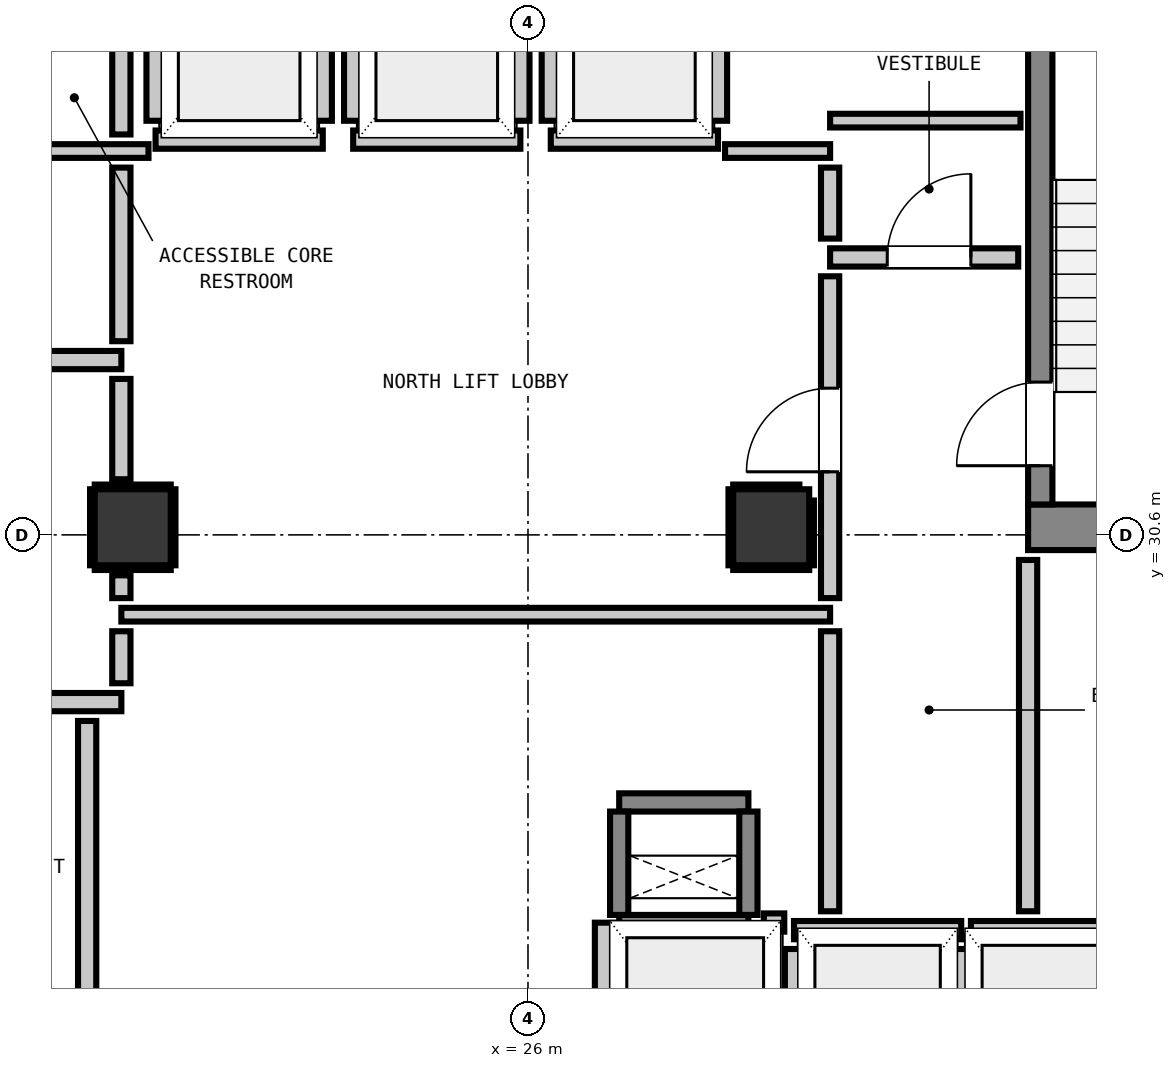
"""IFC4 building model, lengths in metres.
Left out: names, types, materials, properties, quantities, classifications, styles, units other than length and angle.
Written with IfcOpenShell. Run it as: python <this file> out.ifc"""

import sys

from ifc_helpers import new_model, si_unit, direction, frame, frame_2d, origin, origin_2d, place, context, subcontext, project, spatial, rectangle, extrude, element, fill, save


model = new_model("IFC4")
c1 = context("Model", 3, precision=1e-05, world=origin(), true_north=direction((0.0, 1.0)))
c2 = subcontext(c1, "Body", "Model", "MODEL_VIEW")
j1 = project(units=[si_unit("LENGTHUNIT", "METRE"), si_unit("PLANEANGLEUNIT", "RADIAN")], contexts=[c1])
p1 = place(None, origin())
s1 = spatial("IfcSite", under=j1, at=p1, CompositionType="ELEMENT")
p2 = place(p1, origin())
s2 = spatial("IfcBuilding", under=s1, at=p2, CompositionType="ELEMENT")
p3 = place(p2, frame((0.0, 0.0, 38.6)))
s3 = spatial("IfcBuildingStorey", under=s2, at=p3, CompositionType="ELEMENT", Elevation=38.6)
p4 = place(p3, frame((32.58, 30.7, 0.0), z_axis=(0.0, 0.0, 1.0), x_axis=(1.0, 0.0, 0.0)))
e1 = element("IfcWall", 1, at=p4, inside=s3, PredefinedType="SHEAR", context=c2, shape_type="SweptSolid", body=[
    extrude(rectangle(XDim=3.415, YDim=0.6, at=frame_2d((1.708, 0.0))), origin(), (0.0, 0.0, 1.0), 3.32),
])
p5 = place(p3, frame((32.74, 31.0, 0.0), z_axis=(0.0, 0.0, 1.0), x_axis=(0.0, 1.0, 0.0)))
e2 = element("IfcWall", 2, at=p5, inside=s3, PredefinedType="SHEAR", context=c2, shape_type="SweptSolid", body=[
    extrude(rectangle(XDim=7.8, YDim=0.32, at=frame_2d((3.9, 0.0))), origin(), (0.0, 0.0, 1.0), 3.32),
])
p6 = place(p5, frame((0.51, 0.0, 0.0)))
e3 = element("IfcOpeningElement", 3, at=p6, cuts=e2, PredefinedType="OPENING", context=c2, shape_type="SweptSolid", body=[
    extrude(rectangle(XDim=1.1, YDim=2.15, at=frame_2d((0.55, 1.075))), frame((0.0, 0.17, 0.0), z_axis=(0.0, -1.0, 0.0), x_axis=(1.0, 0.0, 0.0)), (0.0, 0.0, 1.0), 0.34),
])
for number, where, z_axis, x_axis in (
    (4, (27.2, 25.48, 0.0), (0.0, 0.0, 1.0), (1.0, 0.0, 0.0)),
    (5, (27.2, 27.08, 0.0), (0.0, 0.0, 1.0), (1.0, 0.0, 0.0)),
):
    element("IfcWall", number, at=place(p3, frame(where, z_axis=z_axis, x_axis=x_axis)), inside=s3, PredefinedType="SHEAR", context=c2, shape_type="SweptSolid", body=[
        extrude(rectangle(XDim=1.7, YDim=0.24, at=frame_2d((0.85, 0.0))), origin(), (0.0, 0.0, 1.0), 3.32),
    ])
for number, where, z_axis, x_axis in (
    (6, (27.2, 25.6, 0.0), (0.0, 0.0, 1.0), (0.0, 1.0, 0.0)),
    (7, (28.9, 25.6, 0.0), (0.0, 0.0, 1.0), (0.0, 1.0, 0.0)),
):
    element("IfcWall", number, at=place(p3, frame(where, z_axis=z_axis, x_axis=x_axis)), inside=s3, PredefinedType="SHEAR", context=c2, shape_type="SweptSolid", body=[
        extrude(rectangle(XDim=1.36, YDim=0.24, at=frame_2d((0.68, 0.0))), origin(), (0.0, 0.0, 1.0), 3.32),
    ])
for number, where, z_axis, x_axis in (
    (8, (20.8, 30.7, 0.0), (0.0, 0.0, 1.0), (1.0, 0.0, 0.0)),
    (9, (29.2, 30.7, 0.0), (0.0, 0.0, 1.0), (1.0, 0.0, 0.0)),
):
    element("IfcColumn", number, at=place(p3, frame(where, z_axis=z_axis, x_axis=x_axis)), inside=s3, PredefinedType="COLUMN", context=c2, shape_type="SweptSolid", body=[
        extrude(rectangle(XDim=1.0, YDim=1.0, at=origin_2d()), origin(), (0.0, 0.0, 1.0), 3.32),
    ])
p7 = place(p3, frame((21.1, 35.8, 0.0), z_axis=(0.0, 0.0, 1.0), x_axis=(1.0, 0.0, 0.0)))
e10 = element("IfcWall", 10, at=p7, inside=s3, PredefinedType="PARTITIONING", context=c2, shape_type="SweptSolid", body=[
    extrude(rectangle(XDim=2.2, YDim=0.24, at=frame_2d((1.1, 0.0))), origin(), (0.0, 0.0, 1.0), 2.9),
])
p8 = place(p3, frame((21.1, 36.048, 0.0), z_axis=(0.0, 0.0, 1.0), x_axis=(0.0, 1.0, 0.0)))
e11 = element("IfcWall", 11, at=p8, inside=s3, PredefinedType="PARTITIONING", context=c2, shape_type="SweptSolid", body=[
    extrude(rectangle(XDim=2.104, YDim=0.24, at=frame_2d((1.052, 0.0))), origin(), (0.0, 0.0, 1.0), 0.905),
])
p9 = place(p3, frame((23.3, 36.048, 0.0), z_axis=(0.0, 0.0, 1.0), x_axis=(0.0, 1.0, 0.0)))
e12 = element("IfcWall", 12, at=p9, inside=s3, PredefinedType="PARTITIONING", context=c2, shape_type="SweptSolid", body=[
    extrude(rectangle(XDim=2.104, YDim=0.24, at=frame_2d((1.052, 0.0))), origin(), (0.0, 0.0, 1.0), 2.9),
])
p10 = place(p3, frame((23.7, 35.8, 0.0), z_axis=(0.0, 0.0, 1.0), x_axis=(1.0, 0.0, 0.0)))
e13 = element("IfcWall", 13, at=p10, inside=s3, PredefinedType="PARTITIONING", context=c2, shape_type="SweptSolid", body=[
    extrude(rectangle(XDim=2.2, YDim=0.24, at=frame_2d((1.1, 0.0))), origin(), (0.0, 0.0, 1.0), 2.9),
])
for number, where, z_axis, x_axis in (
    (14, (23.7, 36.048, 0.0), (0.0, 0.0, 1.0), (0.0, 1.0, 0.0)),
    (15, (25.9, 36.048, 0.0), (0.0, 0.0, 1.0), (0.0, 1.0, 0.0)),
):
    element("IfcWall", number, at=place(p3, frame(where, z_axis=z_axis, x_axis=x_axis)), inside=s3, PredefinedType="PARTITIONING", context=c2, shape_type="SweptSolid", body=[
        extrude(rectangle(XDim=2.104, YDim=0.24, at=frame_2d((1.052, 0.0))), origin(), (0.0, 0.0, 1.0), 2.9),
    ])
p11 = place(p3, frame((26.3, 35.8, 0.0), z_axis=(0.0, 0.0, 1.0), x_axis=(1.0, 0.0, 0.0)))
e16 = element("IfcWall", 16, at=p11, inside=s3, PredefinedType="PARTITIONING", context=c2, shape_type="SweptSolid", body=[
    extrude(rectangle(XDim=2.2, YDim=0.24, at=frame_2d((1.1, 0.0))), origin(), (0.0, 0.0, 1.0), 2.9),
])
p12 = place(p3, frame((26.3, 36.048, 0.0), z_axis=(0.0, 0.0, 1.0), x_axis=(0.0, 1.0, 0.0)))
e17 = element("IfcWall", 17, at=p12, inside=s3, PredefinedType="PARTITIONING", context=c2, shape_type="SweptSolid", body=[
    extrude(rectangle(XDim=2.104, YDim=0.24, at=frame_2d((1.052, 0.0))), origin(), (0.0, 0.0, 1.0), 2.9),
])
p13 = place(p3, frame((28.5, 36.048, 0.0), z_axis=(0.0, 0.0, 1.0), x_axis=(0.0, 1.0, 0.0)))
e18 = element("IfcWall", 18, at=p13, inside=s3, PredefinedType="PARTITIONING", context=c2, shape_type="SweptSolid", body=[
    extrude(rectangle(XDim=2.104, YDim=0.24, at=frame_2d((1.052, 0.0))), origin(), (0.0, 0.0, 1.0), 0.905),
])
p14 = place(p3, frame((29.5, 25.4, 0.0), z_axis=(0.0, 0.0, 1.0), x_axis=(1.0, 0.0, 0.0)))
e19 = element("IfcWall", 19, at=p14, inside=s3, PredefinedType="PARTITIONING", context=c2, shape_type="SweptSolid", body=[
    extrude(rectangle(XDim=2.2, YDim=0.24, at=frame_2d((1.1, 0.0))), origin(), (0.0, 0.0, 1.0), 2.9),
])
p15 = place(p3, frame((29.5, 22.632, 0.0), z_axis=(0.0, 0.0, 1.0), x_axis=(0.0, 1.0, 0.0)))
e20 = element("IfcWall", 20, at=p15, inside=s3, PredefinedType="PARTITIONING", context=c2, shape_type="SweptSolid", body=[
    extrude(rectangle(XDim=2.52, YDim=0.24, at=frame_2d((1.26, 0.0))), origin(), (0.0, 0.0, 1.0), 0.905),
])
p16 = place(p3, frame((31.7, 22.73, 0.0), z_axis=(0.0, 0.0, 1.0), x_axis=(0.0, 1.0, 0.0)))
e21 = element("IfcWall", 21, at=p16, inside=s3, PredefinedType="PARTITIONING", context=c2, shape_type="SweptSolid", body=[
    extrude(rectangle(XDim=2.422, YDim=0.24, at=frame_2d((1.211, 0.0))), origin(), (0.0, 0.0, 1.0), 2.9),
])
p17 = place(p3, frame((31.828, 25.4, 0.0), z_axis=(0.0, 0.0, 1.0), x_axis=(1.0, 0.0, 0.0)))
e22 = element("IfcWall", 22, at=p17, inside=s3, PredefinedType="PARTITIONING", context=c2, shape_type="SweptSolid", body=[
    extrude(rectangle(XDim=2.072, YDim=0.24, at=frame_2d((1.036, 0.0))), origin(), (0.0, 0.0, 1.0), 2.9),
])
p18 = place(p3, frame((29.103, 25.5, 0.0), z_axis=(0.0, 0.0, 1.0), x_axis=(1.0, 0.0, 0.0)))
e23 = element("IfcWall", 23, at=p18, inside=s3, PredefinedType="PARTITIONING", context=c2, shape_type="SweptSolid", body=[
    extrude(rectangle(XDim=0.269, YDim=0.24, at=frame_2d((0.135, 0.0))), origin(), (0.0, 0.0, 1.0), 2.9),
])
p19 = place(p3, frame((27.0, 22.73, 0.0), z_axis=(0.0, 0.0, 1.0), x_axis=(0.0, 1.0, 0.0)))
e24 = element("IfcWall", 24, at=p19, inside=s3, PredefinedType="PARTITIONING", context=c2, shape_type="SweptSolid", body=[
    extrude(rectangle(XDim=2.768, YDim=0.24, at=frame_2d((1.384, 0.0))), origin(), (0.0, 0.0, 1.0), 2.9),
])
p20 = place(p3, frame((17.45, 28.4, 0.0), z_axis=(0.0, 0.0, 1.0), x_axis=(1.0, 0.0, 0.0)))
e25 = element("IfcWall", 25, at=p20, inside=s3, PredefinedType="PARTITIONING", context=c2, shape_type="SweptSolid", body=[
    extrude(rectangle(XDim=3.2, YDim=0.24, at=frame_2d((1.6, 0.0))), origin(), (0.0, 0.0, 1.0), 2.9),
])
p21 = place(p20, frame((0.784, 0.0, 0.0)))
e26 = element("IfcOpeningElement", 26, at=p21, cuts=e25, PredefinedType="OPENING", context=c2, shape_type="SweptSolid", body=[
    extrude(rectangle(XDim=1.1, YDim=2.15, at=frame_2d((0.55, 1.075))), frame((0.0, 0.13, 0.0), z_axis=(0.0, -1.0, 0.0), x_axis=(1.0, 0.0, 0.0)), (0.0, 0.0, 1.0), 0.26),
])
p22 = place(p3, frame((17.45, 32.9, 0.0), z_axis=(0.0, 0.0, 1.0), x_axis=(1.0, 0.0, 0.0)))
e27 = element("IfcWall", 27, at=p22, inside=s3, PredefinedType="PARTITIONING", context=c2, shape_type="SweptSolid", body=[
    extrude(rectangle(XDim=3.2, YDim=0.24, at=frame_2d((1.6, 0.0))), origin(), (0.0, 0.0, 1.0), 2.9),
])
p23 = place(p22, frame((0.159, 0.0, 0.0)))
e28 = element("IfcOpeningElement", 28, at=p23, cuts=e27, PredefinedType="OPENING", context=c2, shape_type="SweptSolid", body=[
    extrude(rectangle(XDim=1.1, YDim=2.15, at=frame_2d((0.55, 1.075))), frame((0.0, 0.13, 0.0), z_axis=(0.0, -1.0, 0.0), x_axis=(1.0, 0.0, 0.0)), (0.0, 0.0, 1.0), 0.26),
])
p24 = place(p3, frame((29.975, 34.25, 0.0), z_axis=(0.0, 0.0, 1.0), x_axis=(1.0, 0.0, 0.0)))
e29 = element("IfcWall", 29, at=p24, inside=s3, PredefinedType="PARTITIONING", context=c2, shape_type="SweptSolid", body=[
    extrude(rectangle(XDim=2.475, YDim=0.24, at=frame_2d((1.237, 0.0))), origin(), (0.0, 0.0, 1.0), 2.9),
])
p25 = place(p24, frame((0.752, 0.0, 0.0)))
e30 = element("IfcOpeningElement", 30, at=p25, cuts=e29, PredefinedType="OPENING", context=c2, shape_type="SweptSolid", body=[
    extrude(rectangle(XDim=1.1, YDim=2.15, at=frame_2d((0.55, 1.075))), frame((0.0, 0.13, 0.0), z_axis=(0.0, -1.0, 0.0), x_axis=(1.0, 0.0, 0.0)), (0.0, 0.0, 1.0), 0.26),
])
p26 = place(p3, frame((20.65, 29.55, 0.0), z_axis=(0.0, 0.0, 1.0), x_axis=(1.0, 0.0, 0.0)))
e31 = element("IfcWall", 31, at=p26, inside=s3, PredefinedType="PARTITIONING", context=c2, shape_type="SweptSolid", body=[
    extrude(rectangle(XDim=9.325, YDim=0.18, at=frame_2d((4.663, 0.0))), origin(), (0.0, 0.0, 1.0), 2.9),
])
p27 = place(p3, frame((18.95, 35.65, 0.0), z_axis=(0.0, 0.0, 1.0), x_axis=(1.0, 0.0, 0.0)))
e32 = element("IfcWall", 32, at=p27, inside=s3, PredefinedType="PARTITIONING", context=c2, shape_type="SweptSolid", body=[
    extrude(rectangle(XDim=2.057, YDim=0.18, at=frame_2d((1.029, 0.0))), origin(), (0.0, 0.0, 1.0), 2.9),
])
p28 = place(p3, frame((28.593, 35.65, 0.0), z_axis=(0.0, 0.0, 1.0), x_axis=(1.0, 0.0, 0.0)))
e33 = element("IfcWall", 33, at=p28, inside=s3, PredefinedType="PARTITIONING", context=c2, shape_type="SweptSolid", body=[
    extrude(rectangle(XDim=1.382, YDim=0.18, at=frame_2d((0.691, 0.0))), origin(), (0.0, 0.0, 1.0), 2.9),
])
p29 = place(p3, frame((29.975, 36.05, 0.0), z_axis=(0.0, 0.0, 1.0), x_axis=(1.0, 0.0, 0.0)))
e34 = element("IfcWall", 34, at=p29, inside=s3, PredefinedType="PARTITIONING", context=c2, shape_type="SweptSolid", body=[
    extrude(rectangle(XDim=2.505, YDim=0.18, at=frame_2d((1.252, 0.0))), origin(), (0.0, 0.0, 1.0), 2.9),
])
p30 = place(p3, frame((20.2, 22.586, 0.0), z_axis=(0.0, 0.0, 1.0), x_axis=(0.0, 1.0, 0.0)))
e35 = element("IfcWall", 35, at=p30, inside=s3, PredefinedType="PARTITIONING", context=c2, shape_type="SweptSolid", body=[
    extrude(rectangle(XDim=5.566, YDim=0.24, at=frame_2d((2.783, 0.0))), origin(), (0.0, 0.0, 1.0), 0.905),
])
p31 = place(p3, frame((20.65, 28.648, 0.0), z_axis=(0.0, 0.0, 1.0), x_axis=(0.0, 1.0, 0.0)))
e36 = element("IfcWall", 36, at=p31, inside=s3, PredefinedType="PARTITIONING", context=c2, shape_type="SweptSolid", body=[
    extrude(rectangle(XDim=0.684, YDim=0.24, at=frame_2d((0.342, 0.0))), origin(), (0.0, 0.0, 1.0), 0.905),
])
p32 = place(p3, frame((20.65, 29.768, 0.0), z_axis=(0.0, 0.0, 1.0), x_axis=(0.0, 1.0, 0.0)))
e37 = element("IfcWall", 37, at=p32, inside=s3, PredefinedType="PARTITIONING", context=c2, shape_type="SweptSolid", body=[
    extrude(rectangle(XDim=0.3, YDim=0.24, at=frame_2d((0.15, 0.0))), origin(), (0.0, 0.0, 1.0), 0.905),
])
p33 = place(p3, frame((20.65, 31.332, 0.0), z_axis=(0.0, 0.0, 1.0), x_axis=(0.0, 1.0, 0.0)))
e38 = element("IfcWall", 38, at=p33, inside=s3, PredefinedType="PARTITIONING", context=c2, shape_type="SweptSolid", body=[
    extrude(rectangle(XDim=1.32, YDim=0.24, at=frame_2d((0.66, 0.0))), origin(), (0.0, 0.0, 1.0), 0.905),
])
p34 = place(p3, frame((20.65, 33.148, 0.0), z_axis=(0.0, 0.0, 1.0), x_axis=(0.0, 1.0, 0.0)))
e39 = element("IfcWall", 39, at=p34, inside=s3, PredefinedType="PARTITIONING", context=c2, shape_type="SweptSolid", body=[
    extrude(rectangle(XDim=2.284, YDim=0.24, at=frame_2d((1.142, 0.0))), origin(), (0.0, 0.0, 1.0), 0.905),
])
p35 = place(p3, frame((20.65, 35.868, 0.0), z_axis=(0.0, 0.0, 1.0), x_axis=(0.0, 1.0, 0.0)))
e40 = element("IfcWall", 40, at=p35, inside=s3, PredefinedType="PARTITIONING", context=c2, shape_type="SweptSolid", body=[
    extrude(rectangle(XDim=2.684, YDim=0.24, at=frame_2d((1.342, 0.0))), origin(), (0.0, 0.0, 1.0), 0.905),
])
p36 = place(p3, frame((29.975, 25.648, 0.0), z_axis=(0.0, 0.0, 1.0), x_axis=(0.0, 1.0, 0.0)))
e41 = element("IfcWall", 41, at=p36, inside=s3, PredefinedType="PARTITIONING", context=c2, shape_type="SweptSolid", body=[
    extrude(rectangle(XDim=3.684, YDim=0.24, at=frame_2d((1.842, 0.0))), origin(), (0.0, 0.0, 1.0), 2.9),
])
p37 = place(p3, frame((29.975, 29.768, 0.0), z_axis=(0.0, 0.0, 1.0), x_axis=(0.0, 1.0, 0.0)))
e42 = element("IfcWall", 42, at=p37, inside=s3, PredefinedType="PARTITIONING", context=c2, shape_type="SweptSolid", body=[
    extrude(rectangle(XDim=4.234, YDim=0.24, at=frame_2d((2.117, 0.0))), origin(), (0.0, 0.0, 1.0), 2.9),
])
p38 = place(p37, frame((1.662, 0.0, 0.0)))
e43 = element("IfcOpeningElement", 43, at=p38, cuts=e42, PredefinedType="OPENING", context=c2, shape_type="SweptSolid", body=[
    extrude(rectangle(XDim=1.1, YDim=2.15, at=frame_2d((0.55, 1.075))), frame((0.0, 0.13, 0.0), z_axis=(0.0, -1.0, 0.0), x_axis=(1.0, 0.0, 0.0)), (0.0, 0.0, 1.0), 0.26),
])
p39 = place(p3, frame((29.975, 34.498, 0.0), z_axis=(0.0, 0.0, 1.0), x_axis=(0.0, 1.0, 0.0)))
e44 = element("IfcWall", 44, at=p39, inside=s3, PredefinedType="PARTITIONING", context=c2, shape_type="SweptSolid", body=[
    extrude(rectangle(XDim=0.934, YDim=0.24, at=frame_2d((0.467, 0.0))), origin(), (0.0, 0.0, 1.0), 2.9),
])
p40 = place(p3, frame((32.58, 25.648, 0.0), z_axis=(0.0, 0.0, 1.0), x_axis=(0.0, 1.0, 0.0)))
e45 = element("IfcWall", 45, at=p40, inside=s3, PredefinedType="PARTITIONING", context=c2, shape_type="SweptSolid", body=[
    extrude(rectangle(XDim=4.622, YDim=0.24, at=frame_2d((2.311, 0.0))), origin(), (0.0, 0.0, 1.0), 2.9),
])
for number, where, z_axis, x_axis in (
    (46, (20.3, 30.168, 0.0), (0.0, 0.0, 1.0), (1.0, 0.0, 0.0)),
    (47, (20.3, 31.232, 0.0), (0.0, 0.0, 1.0), (1.0, 0.0, 0.0)),
    (48, (20.268, 30.2, 0.0), (0.0, 0.0, 1.0), (0.0, 1.0, 0.0)),
    (49, (21.332, 30.2, 0.0), (0.0, 0.0, 1.0), (0.0, 1.0, 0.0)),
    (50, (28.7, 30.168, 0.0), (0.0, 0.0, 1.0), (1.0, 0.0, 0.0)),
):
    element("IfcWall", number, at=place(p3, frame(where, z_axis=z_axis, x_axis=x_axis)), inside=s3, PredefinedType="PARTITIONING", context=c2, shape_type="SweptSolid", body=[
        extrude(rectangle(XDim=1.0, YDim=0.06, at=frame_2d((0.5, 0.0))), origin(), (0.0, 0.0, 1.0), 0.905),
    ])
p41 = place(p3, frame((28.7, 31.232, 0.0), z_axis=(0.0, 0.0, 1.0), x_axis=(1.0, 0.0, 0.0)))
e51 = element("IfcWall", 51, at=p41, inside=s3, PredefinedType="PARTITIONING", context=c2, shape_type="SweptSolid", body=[
    extrude(rectangle(XDim=0.871, YDim=0.06, at=frame_2d((0.436, 0.0))), origin(), (0.0, 0.0, 1.0), 0.905),
])
p42 = place(p3, frame((28.668, 30.2, 0.0), z_axis=(0.0, 0.0, 1.0), x_axis=(0.0, 1.0, 0.0)))
e52 = element("IfcWall", 52, at=p42, inside=s3, PredefinedType="PARTITIONING", context=c2, shape_type="SweptSolid", body=[
    extrude(rectangle(XDim=1.0, YDim=0.06, at=frame_2d((0.5, 0.0))), origin(), (0.0, 0.0, 1.0), 0.905),
])
p43 = place(p3, frame((29.732, 30.2, 0.0), z_axis=(0.0, 0.0, 1.0), x_axis=(0.0, 1.0, 0.0)))
e53 = element("IfcWall", 53, at=p43, inside=s3, PredefinedType="PARTITIONING", context=c2, shape_type="SweptSolid", body=[
    extrude(rectangle(XDim=0.852, YDim=0.06, at=frame_2d((0.426, 0.0))), origin(), (0.0, 0.0, 1.0), 0.905),
])
p44 = place(p6, origin())
e54 = element("IfcDoor", 54, at=p44, inside=s3, OperationType="SINGLE_SWING_LEFT", PredefinedType="DOOR", context=c2, shape_type="SweptSolid", body=[
    extrude(rectangle(XDim=1.1, YDim=2.15, at=frame_2d((0.55, 1.075))), frame((0.0, 0.025, 0.0), z_axis=(0.0, -1.0, 0.0), x_axis=(1.0, 0.0, 0.0)), (0.0, 0.0, 1.0), 0.05),
])
fill(e3, e54)
p45 = place(p38, origin())
e55 = element("IfcDoor", 55, at=p45, inside=s3, OperationType="SINGLE_SWING_LEFT", PredefinedType="DOOR", context=c2, shape_type="SweptSolid", body=[
    extrude(rectangle(XDim=1.1, YDim=2.15, at=frame_2d((0.55, 1.075))), frame((0.0, 0.025, 0.0), z_axis=(0.0, -1.0, 0.0), x_axis=(1.0, 0.0, 0.0)), (0.0, 0.0, 1.0), 0.05),
])
fill(e43, e55)
p46 = place(p25, origin())
e56 = element("IfcDoor", 56, at=p46, inside=s3, OperationType="SINGLE_SWING_RIGHT", PredefinedType="DOOR", context=c2, shape_type="SweptSolid", body=[
    extrude(rectangle(XDim=1.1, YDim=2.15, at=frame_2d((0.55, 1.075))), frame((0.0, 0.025, 0.0), z_axis=(0.0, -1.0, 0.0), x_axis=(1.0, 0.0, 0.0)), (0.0, 0.0, 1.0), 0.05),
])
fill(e30, e56)
save(model, sys.argv[1])
